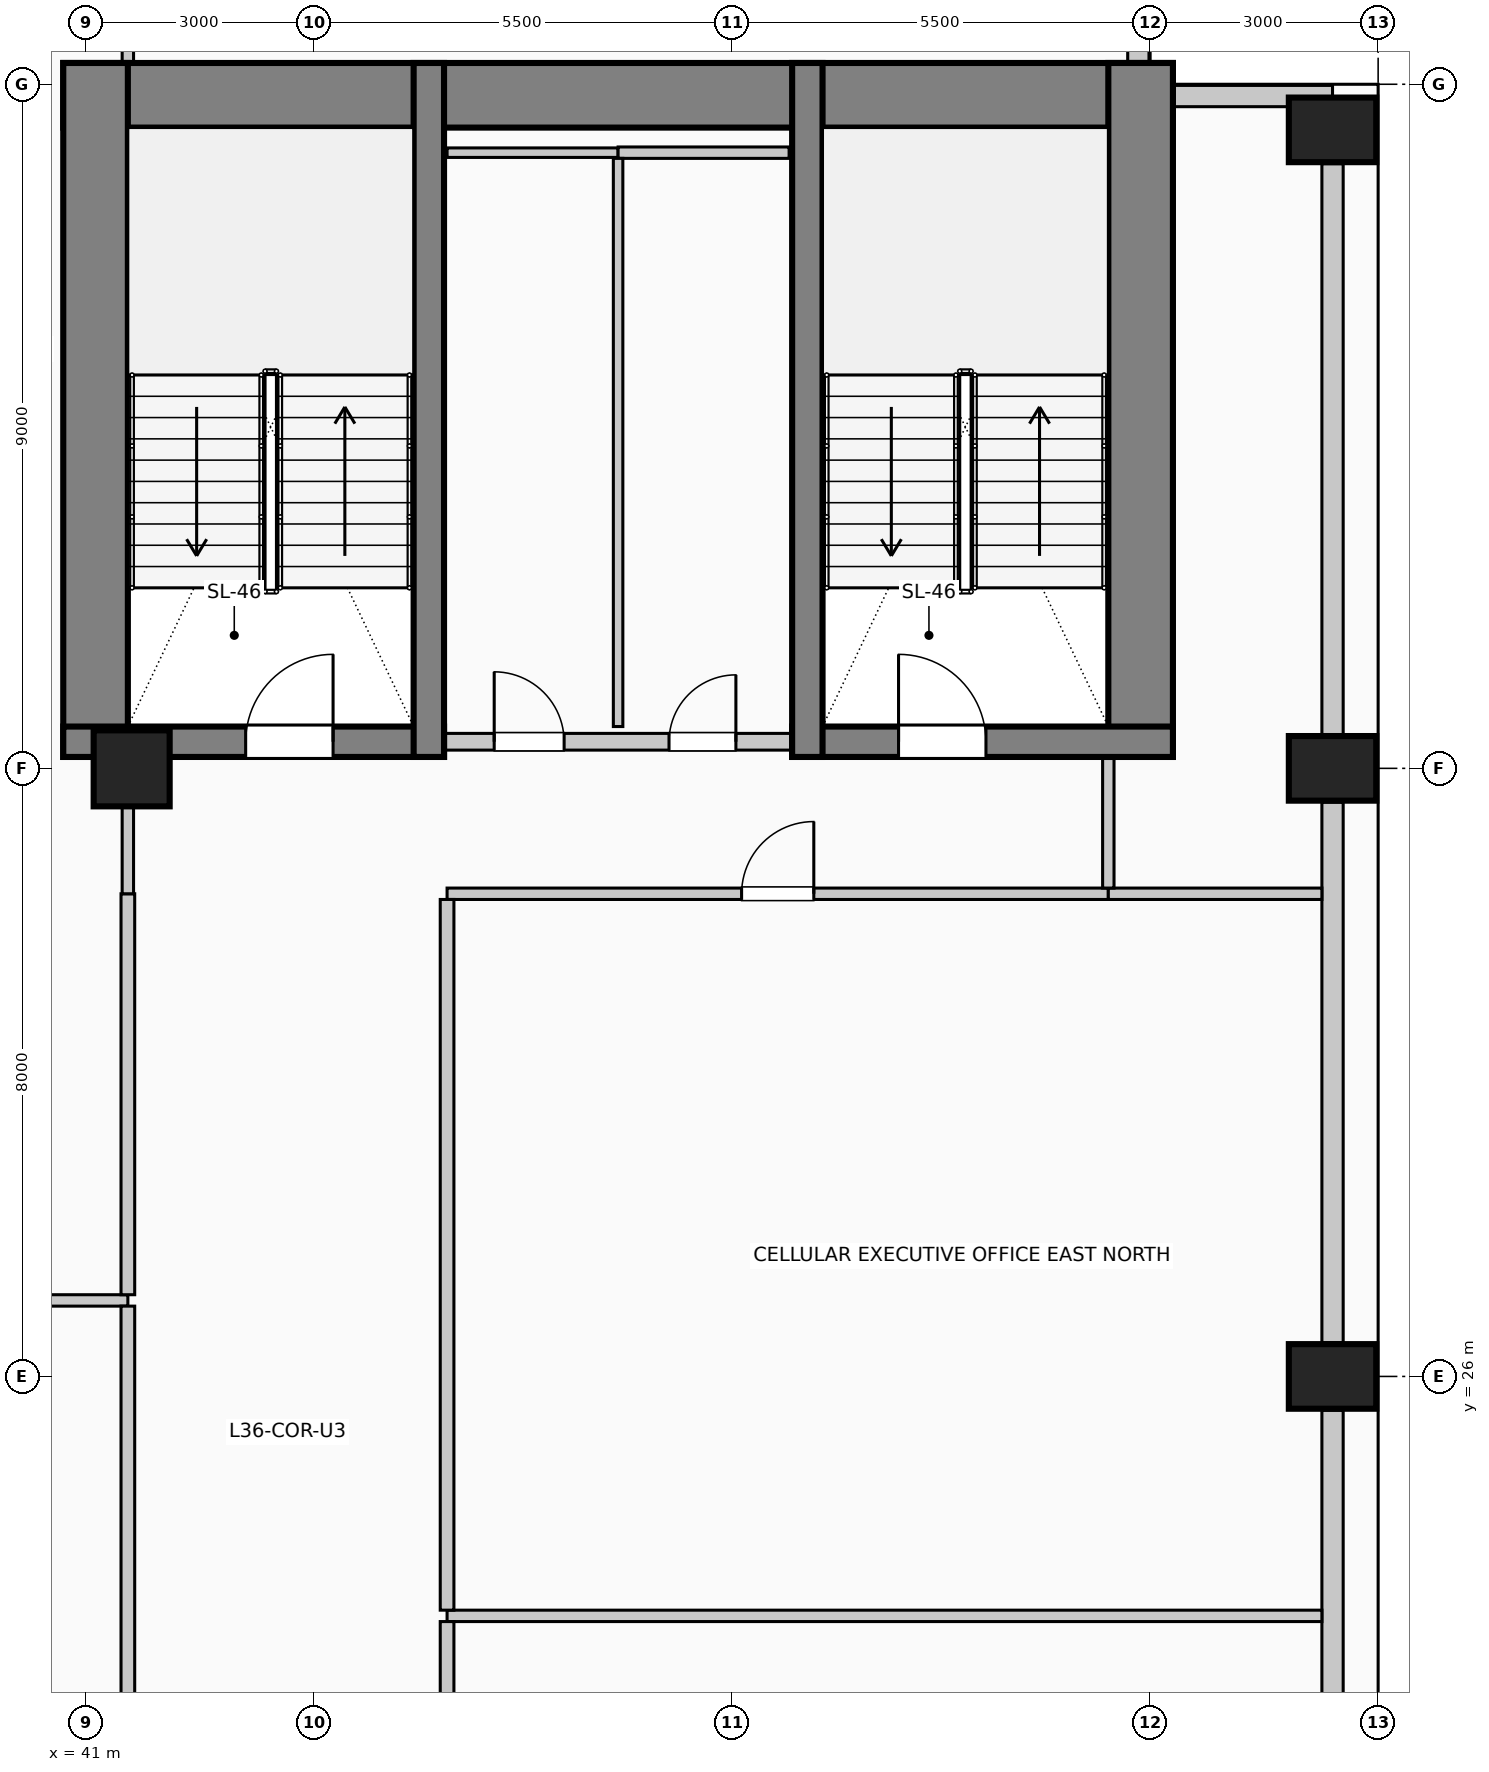
"""IFC4 building model, lengths in metres.
Left out: names, types, materials, properties, quantities, classifications, styles, units other than length and angle.
Written with IfcOpenShell. Run it as: python <this file> out.ifc"""

import sys

from ifc_helpers import new_model, si_unit, direction, frame, frame_2d, origin, origin_2d, place, context, subcontext, project, spatial, rectangle, circle, extrude, element, fill, save


model = new_model("IFC4")
c1 = context("Model", 3, precision=1e-05, world=origin(), true_north=direction((0.0, 1.0)))
c2 = subcontext(c1, "Body", "Model", "MODEL_VIEW")
j1 = project(units=[si_unit("LENGTHUNIT", "METRE"), si_unit("PLANEANGLEUNIT", "RADIAN")], contexts=[c1])
p1 = place(None, origin())
s1 = spatial("IfcSite", under=j1, at=p1, CompositionType="ELEMENT")
p2 = place(p1, origin())
s2 = spatial("IfcBuilding", under=s1, at=p2, CompositionType="ELEMENT")
p3 = place(p2, frame((0.0, 0.0, 148.6)))
s3 = spatial("IfcBuildingStorey", under=s2, at=p3, CompositionType="ELEMENT", Elevation=148.6)
p4 = place(p3, frame((40.7, 42.855, 0.0), z_axis=(0.0, 0.0, 1.0), x_axis=(1.0, 0.0, 0.0)))
e1 = element("IfcWall", 1, at=p4, inside=s3, PredefinedType="SHEAR", context=c2, shape_type="SweptSolid", body=[
    extrude(rectangle(XDim=14.6, YDim=0.85, at=frame_2d((7.3, 0.0))), origin(), (0.0, 0.0, 1.0), 4.0),
])
for number, where, z_axis, x_axis in (
    (2, (41.125, 34.15, 0.0), (0.0, 0.0, 1.0), (0.0, 1.0, 0.0)),
    (3, (54.875, 34.15, 0.0), (0.0, 0.0, 1.0), (0.0, 1.0, 0.0)),
):
    element("IfcWall", number, at=place(p3, frame(where, z_axis=z_axis, x_axis=x_axis)), inside=s3, PredefinedType="SHEAR", context=c2, shape_type="SweptSolid", body=[
        extrude(rectangle(XDim=9.13, YDim=0.85, at=frame_2d((4.565, 0.0))), origin(), (0.0, 0.0, 1.0), 4.0),
    ])
p5 = place(p3, frame((40.7, 34.35, 0.0), z_axis=(0.0, 0.0, 1.0), x_axis=(1.0, 0.0, 0.0)))
e4 = element("IfcWall", 4, at=p5, inside=s3, PredefinedType="SHEAR", context=c2, shape_type="SweptSolid", body=[
    extrude(rectangle(XDim=5.01, YDim=0.4, at=frame_2d((2.505, 0.0))), origin(), (0.0, 0.0, 1.0), 4.0),
])
p6 = place(p5, frame((2.4, 0.0, 0.0)))
e5 = element("IfcOpeningElement", 5, at=p6, cuts=e4, PredefinedType="OPENING", context=c2, shape_type="SweptSolid", body=[
    extrude(rectangle(XDim=1.15, YDim=2.2, at=frame_2d((0.575, 1.1))), frame((0.0, 0.21, 0.0), z_axis=(0.0, -1.0, 0.0), x_axis=(1.0, 0.0, 0.0)), (0.0, 0.0, 1.0), 0.42),
])
p7 = place(p3, frame((45.51, 34.15, 0.0), z_axis=(0.0, 0.0, 1.0), x_axis=(0.0, 1.0, 0.0)))
e6 = element("IfcWall", 6, at=p7, inside=s3, PredefinedType="SHEAR", context=c2, shape_type="SweptSolid", body=[
    extrude(rectangle(XDim=9.13, YDim=0.4, at=frame_2d((4.565, 0.0))), origin(), (0.0, 0.0, 1.0), 4.0),
])
p8 = place(p3, frame((50.29, 34.35, 0.0), z_axis=(0.0, 0.0, 1.0), x_axis=(1.0, 0.0, 0.0)))
e7 = element("IfcWall", 7, at=p8, inside=s3, PredefinedType="SHEAR", context=c2, shape_type="SweptSolid", body=[
    extrude(rectangle(XDim=5.01, YDim=0.4, at=frame_2d((2.505, 0.0))), origin(), (0.0, 0.0, 1.0), 4.0),
])
p9 = place(p8, frame((1.4, 0.0, 0.0)))
e8 = element("IfcOpeningElement", 8, at=p9, cuts=e7, PredefinedType="OPENING", context=c2, shape_type="SweptSolid", body=[
    extrude(rectangle(XDim=1.15, YDim=2.2, at=frame_2d((0.575, 1.1))), frame((0.0, 0.21, 0.0), z_axis=(0.0, -1.0, 0.0), x_axis=(1.0, 0.0, 0.0)), (0.0, 0.0, 1.0), 0.42),
])
p10 = place(p3, frame((50.49, 34.15, 0.0), z_axis=(0.0, 0.0, 1.0), x_axis=(0.0, 1.0, 0.0)))
e9 = element("IfcWall", 9, at=p10, inside=s3, PredefinedType="SHEAR", context=c2, shape_type="SweptSolid", body=[
    extrude(rectangle(XDim=9.13, YDim=0.4, at=frame_2d((4.565, 0.0))), origin(), (0.0, 0.0, 1.0), 4.0),
])
for number, where, z_axis, x_axis in (
    (10, (57.4, 26.0, 0.0), (0.0, 0.0, 1.0), (0.0, 1.0, 0.0)),
    (11, (57.4, 34.0, 0.0), (0.0, 0.0, 1.0), (0.0, 1.0, 0.0)),
    (12, (57.4, 42.4, 0.0), (0.0, 0.0, 1.0), (0.0, 1.0, 0.0)),
):
    element("IfcColumn", number, at=place(p3, frame(where, z_axis=z_axis, x_axis=x_axis)), inside=s3, PredefinedType="COLUMN", context=c2, shape_type="SweptSolid", body=[
        extrude(rectangle(XDim=0.85, YDim=1.15, at=origin_2d()), origin(), (0.0, 0.0, 1.0), 4.0),
    ])
p11 = place(p3, frame((41.6, 34.0, 0.0), z_axis=(0.0, 0.0, 1.0), x_axis=(1.0, 0.0, 0.0)))
e13 = element("IfcColumn", 13, at=p11, inside=s3, PredefinedType="COLUMN", context=c2, shape_type="SweptSolid", body=[
    extrude(circle(Radius=0.5, at=origin_2d()), origin(), (0.0, 0.0, 1.0), 4.0),
])
p12 = place(p3, frame((57.4, 25.555, 0.0), z_axis=(0.0, 0.0, 1.0), x_axis=(0.0, -1.0, 0.0)))
e14 = element("IfcWall", 14, at=p12, inside=s3, PredefinedType="SOLIDWALL", context=c2, shape_type="SweptSolid", body=[
    extrude(rectangle(XDim=7.11, YDim=0.28, at=frame_2d((3.555, 0.0))), origin(), (0.0, 0.0, 1.0), 2.875),
])
p13 = place(p12, frame((4.007, 0.0, 0.5)))
e15 = element("IfcOpeningElement", 15, at=p13, cuts=e14, PredefinedType="OPENING", context=c2, shape_type="SweptSolid", body=[
    extrude(rectangle(XDim=2.2, YDim=1.95, at=frame_2d((1.1, 0.975))), frame((0.0, 0.15, 0.0), z_axis=(0.0, -1.0, 0.0), x_axis=(1.0, 0.0, 0.0)), (0.0, 0.0, 1.0), 0.3),
])
p14 = place(p3, frame((57.4, 33.555, 0.0), z_axis=(0.0, 0.0, 1.0), x_axis=(0.0, -1.0, 0.0)))
e16 = element("IfcWall", 16, at=p14, inside=s3, PredefinedType="SOLIDWALL", context=c2, shape_type="SweptSolid", body=[
    extrude(rectangle(XDim=7.11, YDim=0.28, at=frame_2d((3.555, 0.0))), origin(), (0.0, 0.0, 1.0), 2.875),
])
p15 = place(p3, frame((57.4, 41.955, 0.0), z_axis=(0.0, 0.0, 1.0), x_axis=(0.0, -1.0, 0.0)))
e17 = element("IfcWall", 17, at=p15, inside=s3, PredefinedType="SOLIDWALL", context=c2, shape_type="SweptSolid", body=[
    extrude(rectangle(XDim=7.51, YDim=0.28, at=frame_2d((3.755, 0.0))), origin(), (0.0, 0.0, 1.0), 2.875),
])
p16 = place(p3, frame((54.845, 45.4, 0.0), z_axis=(0.0, 0.0, 1.0), x_axis=(0.0, -1.0, 0.0)))
e18 = element("IfcWall", 18, at=p16, inside=s3, PredefinedType="SOLIDWALL", context=c2, shape_type="SweptSolid", body=[
    extrude(rectangle(XDim=2.115, YDim=0.28, at=frame_2d((1.058, 0.0))), origin(), (0.0, 0.0, 1.0), 3.725),
])
p17 = place(p3, frame((55.305, 42.845, 0.0), z_axis=(0.0, 0.0, 1.0), x_axis=(1.0, 0.0, 0.0)))
e19 = element("IfcWall", 19, at=p17, inside=s3, PredefinedType="SOLIDWALL", context=c2, shape_type="SweptSolid", body=[
    extrude(rectangle(XDim=2.095, YDim=0.28, at=frame_2d((1.047, 0.0))), origin(), (0.0, 0.0, 1.0), 3.725),
])
p18 = place(p3, frame((45.72, 34.35, 0.0), z_axis=(0.0, 0.0, 1.0), x_axis=(1.0, 0.0, 0.0)))
e20 = element("IfcWall", 20, at=p18, inside=s3, PredefinedType="PARTITIONING", context=c2, shape_type="SweptSolid", body=[
    extrude(rectangle(XDim=4.56, YDim=0.22, at=frame_2d((2.28, 0.0))), origin(), (0.0, 0.0, 1.0), 3.725),
])
p19 = place(p18, frame((0.65, 0.0, 0.0)))
e21 = element("IfcOpeningElement", 21, at=p19, cuts=e20, PredefinedType="OPENING", context=c2, shape_type="SweptSolid", body=[
    extrude(rectangle(XDim=0.92, YDim=2.1, at=frame_2d((0.46, 1.05))), frame((0.0, 0.12, 0.0), z_axis=(0.0, -1.0, 0.0), x_axis=(1.0, 0.0, 0.0)), (0.0, 0.0, 1.0), 0.24),
])
p20 = place(p18, frame((2.95, 0.0, 0.0)))
e22 = element("IfcOpeningElement", 22, at=p20, cuts=e20, PredefinedType="OPENING", context=c2, shape_type="SweptSolid", body=[
    extrude(rectangle(XDim=0.88, YDim=2.1, at=frame_2d((0.44, 1.05))), frame((0.0, 0.12, 0.0), z_axis=(0.0, -1.0, 0.0), x_axis=(1.0, 0.0, 0.0)), (0.0, 0.0, 1.0), 0.24),
])
p21 = place(p3, frame((45.75, 22.85, 0.0), z_axis=(0.0, 0.0, 1.0), x_axis=(1.0, 0.0, 0.0)))
e23 = element("IfcWall", 23, at=p21, inside=s3, PredefinedType="PARTITIONING", context=c2, shape_type="SweptSolid", body=[
    extrude(rectangle(XDim=11.51, YDim=0.15, at=frame_2d((5.755, 0.0))), origin(), (0.0, 0.0, 1.0), 3.725),
])
p22 = place(p3, frame((37.9, 27.0, 0.0), z_axis=(0.0, 0.0, 1.0), x_axis=(1.0, 0.0, 0.0)))
e24 = element("IfcWall", 24, at=p22, inside=s3, PredefinedType="PARTITIONING", context=c2, shape_type="SweptSolid", body=[
    extrude(rectangle(XDim=3.65, YDim=0.15, at=frame_2d((1.825, 0.0))), origin(), (0.0, 0.0, 1.0), 3.725),
])
p23 = place(p3, frame((45.75, 32.35, 0.0), z_axis=(0.0, 0.0, 1.0), x_axis=(1.0, 0.0, 0.0)))
e25 = element("IfcWall", 25, at=p23, inside=s3, PredefinedType="PARTITIONING", context=c2, shape_type="SweptSolid", body=[
    extrude(rectangle(XDim=8.7, YDim=0.15, at=frame_2d((4.35, 0.0))), origin(), (0.0, 0.0, 1.0), 3.725),
])
p24 = place(p23, frame((3.875, 0.0, 0.0)))
e26 = element("IfcOpeningElement", 26, at=p24, cuts=e25, PredefinedType="OPENING", context=c2, shape_type="SweptSolid", body=[
    extrude(rectangle(XDim=0.95, YDim=2.15, at=frame_2d((0.475, 1.075))), frame((0.0, 0.085, 0.0), z_axis=(0.0, -1.0, 0.0), x_axis=(1.0, 0.0, 0.0)), (0.0, 0.0, 1.0), 0.17),
])
p25 = place(p3, frame((54.45, 32.35, 0.0), z_axis=(0.0, 0.0, 1.0), x_axis=(1.0, 0.0, 0.0)))
e27 = element("IfcWall", 27, at=p25, inside=s3, PredefinedType="PARTITIONING", context=c2, shape_type="SweptSolid", body=[
    extrude(rectangle(XDim=2.81, YDim=0.15, at=frame_2d((1.405, 0.0))), origin(), (0.0, 0.0, 1.0), 3.725),
])
p26 = place(p3, frame((45.75, 42.1, 0.0), z_axis=(0.0, 0.0, 1.0), x_axis=(1.0, 0.0, 0.0)))
e28 = element("IfcWall", 28, at=p26, inside=s3, PredefinedType="PARTITIONING", context=c2, shape_type="SweptSolid", body=[
    extrude(rectangle(XDim=2.25, YDim=0.125, at=frame_2d((1.125, 0.0))), origin(), (0.0, 0.0, 1.0), 3.725),
])
p27 = place(p3, frame((48.0, 42.1, 0.0), z_axis=(0.0, 0.0, 1.0), x_axis=(1.0, 0.0, 0.0)))
e29 = element("IfcWall", 29, at=p27, inside=s3, PredefinedType="PARTITIONING", context=c2, shape_type="SweptSolid", body=[
    extrude(rectangle(XDim=2.25, YDim=0.15, at=frame_2d((1.125, 0.0))), origin(), (0.0, 0.0, 1.0), 3.725),
])
p28 = place(p3, frame((41.55, 18.5, 0.0), z_axis=(0.0, 0.0, 1.0), x_axis=(0.0, 1.0, 0.0)))
e30 = element("IfcWall", 30, at=p28, inside=s3, PredefinedType="PARTITIONING", context=c2, shape_type="SweptSolid", body=[
    extrude(rectangle(XDim=8.425, YDim=0.18, at=frame_2d((4.212, 0.0))), origin(), (0.0, 0.0, 1.0), 3.07),
])
p29 = place(p3, frame((41.55, 27.075, 0.0), z_axis=(0.0, 0.0, 1.0), x_axis=(0.0, 1.0, 0.0)))
e31 = element("IfcWall", 31, at=p29, inside=s3, PredefinedType="PARTITIONING", context=c2, shape_type="SweptSolid", body=[
    extrude(rectangle(XDim=5.275, YDim=0.18, at=frame_2d((2.638, 0.0))), origin(), (0.0, 0.0, 1.0), 3.07),
])
p30 = place(p3, frame((41.55, 32.35, 0.0), z_axis=(0.0, 0.0, 1.0), x_axis=(0.0, 1.0, 0.0)))
e32 = element("IfcWall", 32, at=p30, inside=s3, PredefinedType="PARTITIONING", context=c2, shape_type="SweptSolid", body=[
    extrude(rectangle(XDim=1.15, YDim=0.15, at=frame_2d((0.575, 0.0))), origin(), (0.0, 0.0, 1.0), 3.07),
])
p31 = place(p3, frame((41.55, 43.28, 0.0), z_axis=(0.0, 0.0, 1.0), x_axis=(0.0, 1.0, 0.0)))
e33 = element("IfcWall", 33, at=p31, inside=s3, PredefinedType="PARTITIONING", context=c2, shape_type="SweptSolid", body=[
    extrude(rectangle(XDim=1.42, YDim=0.15, at=frame_2d((0.71, 0.0))), origin(), (0.0, 0.0, 1.0), 3.725),
])
p32 = place(p3, frame((45.75, 15.74, 0.0), z_axis=(0.0, 0.0, 1.0), x_axis=(0.0, 1.0, 0.0)))
e34 = element("IfcWall", 34, at=p32, inside=s3, PredefinedType="PARTITIONING", context=c2, shape_type="SweptSolid", body=[
    extrude(rectangle(XDim=7.035, YDim=0.18, at=frame_2d((3.518, 0.0))), origin(), (0.0, 0.0, 1.0), 3.725),
])
p33 = place(p3, frame((45.75, 22.925, 0.0), z_axis=(0.0, 0.0, 1.0), x_axis=(0.0, 1.0, 0.0)))
e35 = element("IfcWall", 35, at=p33, inside=s3, PredefinedType="PARTITIONING", context=c2, shape_type="SweptSolid", body=[
    extrude(rectangle(XDim=9.35, YDim=0.18, at=frame_2d((4.675, 0.0))), origin(), (0.0, 0.0, 1.0), 3.725),
])
p34 = place(p3, frame((48.0, 34.55, 0.0), z_axis=(0.0, 0.0, 1.0), x_axis=(0.0, 1.0, 0.0)))
e36 = element("IfcWall", 36, at=p34, inside=s3, PredefinedType="PARTITIONING", context=c2, shape_type="SweptSolid", body=[
    extrude(rectangle(XDim=7.475, YDim=0.125, at=frame_2d((3.737, 0.0))), origin(), (0.0, 0.0, 1.0), 3.725),
])
p35 = place(p3, frame((54.45, 32.425, 0.0), z_axis=(0.0, 0.0, 1.0), x_axis=(0.0, 1.0, 0.0)))
e37 = element("IfcWall", 37, at=p35, inside=s3, PredefinedType="PARTITIONING", context=c2, shape_type="SweptSolid", body=[
    extrude(rectangle(XDim=1.725, YDim=0.15, at=frame_2d((0.862, 0.0))), origin(), (0.0, 0.0, 1.0), 3.725),
])
p36 = place(p6, origin())
e38 = element("IfcDoor", 38, at=p36, inside=s3, OperationType="SINGLE_SWING_RIGHT", PredefinedType="DOOR", context=c2, shape_type="SweptSolid", body=[
    extrude(rectangle(XDim=1.15, YDim=2.2, at=frame_2d((0.575, 1.1))), frame((0.0, 0.025, 0.0), z_axis=(0.0, -1.0, 0.0), x_axis=(1.0, 0.0, 0.0)), (0.0, 0.0, 1.0), 0.05),
])
fill(e5, e38)
p37 = place(p19, origin())
e39 = element("IfcDoor", 39, at=p37, inside=s3, OperationType="SINGLE_SWING_LEFT", PredefinedType="DOOR", context=c2, shape_type="SweptSolid", body=[
    extrude(rectangle(XDim=0.92, YDim=2.1, at=frame_2d((0.46, 1.05))), frame((0.0, 0.025, 0.0), z_axis=(0.0, -1.0, 0.0), x_axis=(1.0, 0.0, 0.0)), (0.0, 0.0, 1.0), 0.05),
])
fill(e21, e39)
p38 = place(p20, origin())
e40 = element("IfcDoor", 40, at=p38, inside=s3, OperationType="SINGLE_SWING_RIGHT", PredefinedType="DOOR", context=c2, shape_type="SweptSolid", body=[
    extrude(rectangle(XDim=0.88, YDim=2.1, at=frame_2d((0.44, 1.05))), frame((0.0, 0.025, 0.0), z_axis=(0.0, -1.0, 0.0), x_axis=(1.0, 0.0, 0.0)), (0.0, 0.0, 1.0), 0.05),
])
fill(e22, e40)
p39 = place(p9, origin())
e41 = element("IfcDoor", 41, at=p39, inside=s3, OperationType="SINGLE_SWING_LEFT", PredefinedType="DOOR", context=c2, shape_type="SweptSolid", body=[
    extrude(rectangle(XDim=1.15, YDim=2.2, at=frame_2d((0.575, 1.1))), frame((0.0, 0.025, 0.0), z_axis=(0.0, -1.0, 0.0), x_axis=(1.0, 0.0, 0.0)), (0.0, 0.0, 1.0), 0.05),
])
fill(e8, e41)
p40 = place(p24, origin())
e42 = element("IfcDoor", 42, at=p40, inside=s3, OperationType="SINGLE_SWING_RIGHT", PredefinedType="DOOR", context=c2, shape_type="SweptSolid", body=[
    extrude(rectangle(XDim=0.95, YDim=2.15, at=frame_2d((0.475, 1.075))), frame((0.0, 0.025, 0.0), z_axis=(0.0, -1.0, 0.0), x_axis=(1.0, 0.0, 0.0)), (0.0, 0.0, 1.0), 0.05),
])
fill(e26, e42)
save(model, sys.argv[1])
